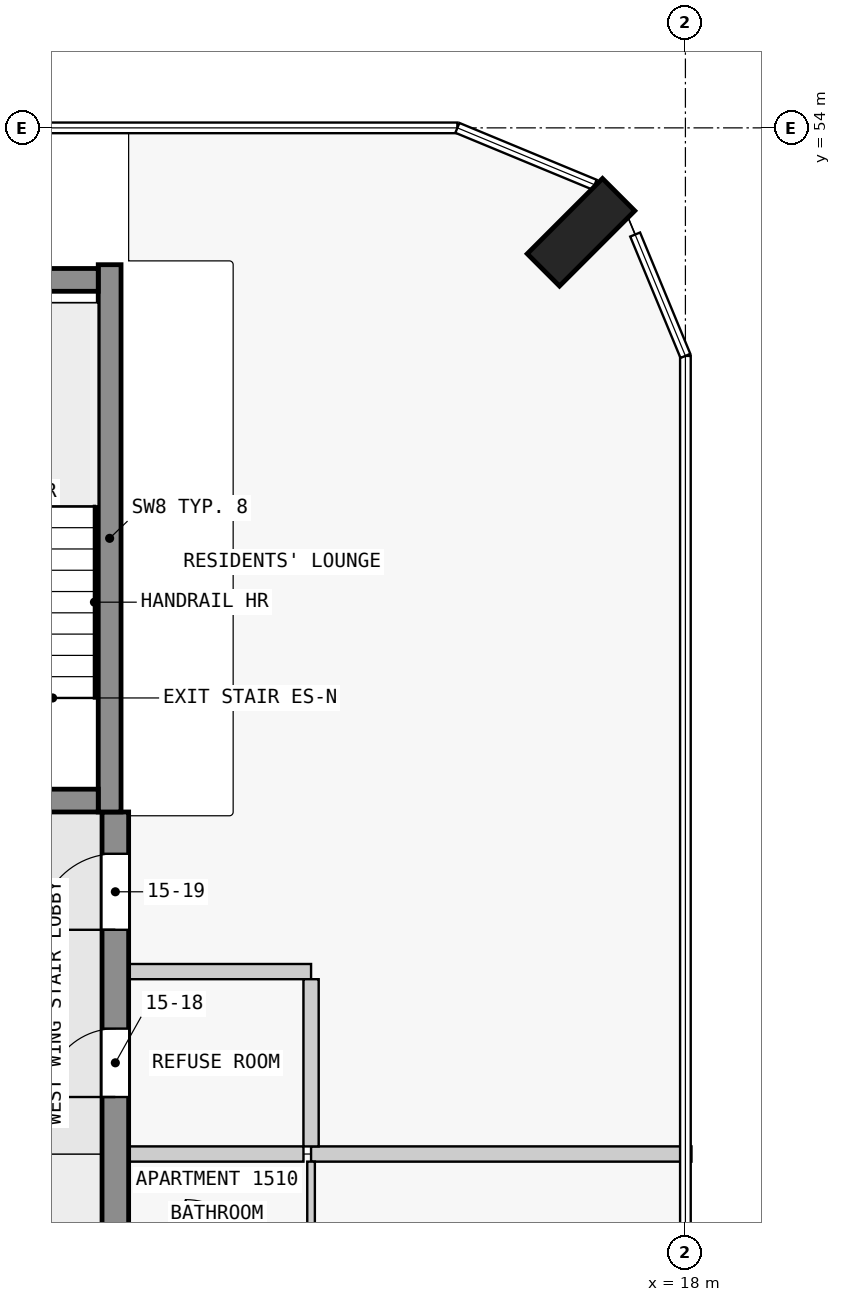
"""IFC4 building model, lengths in metres.
Left out: names, types, materials, properties, quantities, classifications, styles, units other than length and angle.
Written with IfcOpenShell. Run it as: python <this file> out.ifc"""

import sys

from ifc_helpers import new_model, si_unit, direction, frame, frame_2d, origin, origin_2d, place, context, subcontext, project, spatial, rectangle, extrude, element, fill, save


model = new_model("IFC4")
c1 = context("Model", 3, precision=1e-05, world=origin(), true_north=direction((0.0, 1.0)))
c2 = subcontext(c1, "Body", "Model", "MODEL_VIEW")
j1 = project(units=[si_unit("LENGTHUNIT", "METRE"), si_unit("PLANEANGLEUNIT", "RADIAN")], contexts=[c1])
p1 = place(None, origin())
s1 = spatial("IfcSite", under=j1, at=p1, CompositionType="ELEMENT")
p2 = place(p1, origin())
s2 = spatial("IfcBuilding", under=s1, at=p2, CompositionType="ELEMENT")
p3 = place(p2, frame((0.0, 0.0, 61.8)))
s3 = spatial("IfcBuildingStorey", under=s2, at=p3, CompositionType="ELEMENT", Elevation=61.8)
p4 = place(p3, frame((16.626, 52.626, 0.0), z_axis=(0.0, 0.0, 1.0), x_axis=(-0.707106781187, 0.707106781187, 0.0)))
e1 = element("IfcColumn", 1, at=p4, inside=s3, PredefinedType="COLUMN", context=c2, shape_type="SweptSolid", body=[
    extrude(rectangle(XDim=0.6, YDim=1.4, at=origin_2d()), origin(), (0.0, 0.0, 1.0), 3.5),
])
p5 = place(p3, frame((7.725, 45.15, 0.0), z_axis=(0.0, 0.0, 1.0), x_axis=(1.0, 0.0, 0.0)))
e2 = element("IfcWall", 2, at=p5, inside=s3, PredefinedType="SHEAR", context=c2, shape_type="SweptSolid", body=[
    extrude(rectangle(XDim=2.55, YDim=0.3, at=frame_2d((1.275, 0.0))), origin(), (0.0, 0.0, 1.0), 3.5),
])
p6 = place(p5, frame((0.725, 0.0, 0.0)))
e3 = element("IfcOpeningElement", 3, at=p6, cuts=e2, PredefinedType="OPENING", context=c2, shape_type="SweptSolid", body=[
    extrude(rectangle(XDim=1.1, YDim=2.1, at=frame_2d((0.55, 1.05))), frame((0.0, 0.16, 0.0), z_axis=(0.0, -1.0, 0.0), x_axis=(1.0, 0.0, 0.0)), (0.0, 0.0, 1.0), 0.32),
])
p7 = place(p3, frame((7.725, 52.0, 0.0), z_axis=(0.0, 0.0, 1.0), x_axis=(1.0, 0.0, 0.0)))
e4 = element("IfcWall", 4, at=p7, inside=s3, PredefinedType="SHEAR", context=c2, shape_type="SweptSolid", body=[
    extrude(rectangle(XDim=2.55, YDim=0.3, at=frame_2d((1.275, 0.0))), origin(), (0.0, 0.0, 1.0), 3.5),
])
p8 = place(p3, frame((10.425, 45.0, 0.0), z_axis=(0.0, 0.0, 1.0), x_axis=(0.0, 1.0, 0.0)))
e5 = element("IfcWall", 5, at=p8, inside=s3, PredefinedType="SHEAR", context=c2, shape_type="SweptSolid", body=[
    extrude(rectangle(XDim=7.2, YDim=0.3, at=frame_2d((3.6, 0.0))), origin(), (0.0, 0.0, 1.0), 3.5),
])
p9 = place(p3, frame((10.5, 18.0, 0.0), z_axis=(0.0, 0.0, 1.0), x_axis=(0.0, 1.0, 0.0)))
e6 = element("IfcWall", 6, at=p9, inside=s3, PredefinedType="SHEAR", context=c2, shape_type="SweptSolid", body=[
    extrude(rectangle(XDim=27.0, YDim=0.35, at=frame_2d((13.5, 0.0))), origin(), (0.0, 0.0, 1.0), 3.25),
])
p10 = place(p9, frame((4.05, 0.0, 0.0)))
e7 = element("IfcOpeningElement", 7, at=p10, cuts=e6, PredefinedType="OPENING", context=c2, shape_type="SweptSolid", body=[
    extrude(rectangle(XDim=1.0, YDim=2.1, at=frame_2d((0.5, 1.05))), frame((0.0, 0.185, 0.0), z_axis=(0.0, -1.0, 0.0), x_axis=(1.0, 0.0, 0.0)), (0.0, 0.0, 1.0), 0.37),
])
p11 = place(p9, frame((10.75, 0.0, 0.0)))
e8 = element("IfcOpeningElement", 8, at=p11, cuts=e6, PredefinedType="OPENING", context=c2, shape_type="SweptSolid", body=[
    extrude(rectangle(XDim=1.0, YDim=2.1, at=frame_2d((0.5, 1.05))), frame((0.0, 0.185, 0.0), z_axis=(0.0, -1.0, 0.0), x_axis=(1.0, 0.0, 0.0)), (0.0, 0.0, 1.0), 0.37),
])
p12 = place(p9, frame((15.25, 0.0, 0.0)))
e9 = element("IfcOpeningElement", 9, at=p12, cuts=e6, PredefinedType="OPENING", context=c2, shape_type="SweptSolid", body=[
    extrude(rectangle(XDim=1.0, YDim=2.1, at=frame_2d((0.5, 1.05))), frame((0.0, 0.185, 0.0), z_axis=(0.0, -1.0, 0.0), x_axis=(1.0, 0.0, 0.0)), (0.0, 0.0, 1.0), 0.37),
])
p13 = place(p9, frame((19.75, 0.0, 0.0)))
e10 = element("IfcOpeningElement", 10, at=p13, cuts=e6, PredefinedType="OPENING", context=c2, shape_type="SweptSolid", body=[
    extrude(rectangle(XDim=1.0, YDim=2.1, at=frame_2d((0.5, 1.05))), frame((0.0, 0.185, 0.0), z_axis=(0.0, -1.0, 0.0), x_axis=(1.0, 0.0, 0.0)), (0.0, 0.0, 1.0), 0.37),
])
p14 = place(p9, frame((23.25, 0.0, 0.0)))
e11 = element("IfcOpeningElement", 11, at=p14, cuts=e6, PredefinedType="OPENING", context=c2, shape_type="SweptSolid", body=[
    extrude(rectangle(XDim=0.9, YDim=2.1, at=frame_2d((0.45, 1.05))), frame((0.0, 0.185, 0.0), z_axis=(0.0, -1.0, 0.0), x_axis=(1.0, 0.0, 0.0)), (0.0, 0.0, 1.0), 0.37),
])
p15 = place(p9, frame((25.45, 0.0, 0.0)))
e12 = element("IfcOpeningElement", 12, at=p15, cuts=e6, PredefinedType="OPENING", context=c2, shape_type="SweptSolid", body=[
    extrude(rectangle(XDim=1.0, YDim=2.1, at=frame_2d((0.5, 1.05))), frame((0.0, 0.185, 0.0), z_axis=(0.0, -1.0, 0.0), x_axis=(1.0, 0.0, 0.0)), (0.0, 0.0, 1.0), 0.37),
])
p16 = place(p3, frame((12.975, 40.5, 0.0), z_axis=(0.0, 0.0, 1.0), x_axis=(-1.0, 0.0, 0.0)))
e13 = element("IfcWall", 13, at=p16, inside=s3, PredefinedType="PARTITIONING", context=c2, shape_type="SweptSolid", body=[
    extrude(rectangle(XDim=2.3, YDim=0.2, at=frame_2d((1.15, 0.0))), origin(), (0.0, 0.0, 1.0), 3.25),
])
p17 = place(p3, frame((13.075, 40.5, 0.0), z_axis=(0.0, 0.0, 1.0), x_axis=(1.0, 0.0, 0.0)))
e14 = element("IfcWall", 14, at=p17, inside=s3, PredefinedType="PARTITIONING", context=c2, shape_type="SweptSolid", body=[
    extrude(rectangle(XDim=5.005, YDim=0.2, at=frame_2d((2.502, 0.0))), origin(), (0.0, 0.0, 1.0), 3.25),
])
p18 = place(p3, frame((13.075, 42.9, 0.0), z_axis=(0.0, 0.0, 1.0), x_axis=(-1.0, 0.0, 0.0)))
e15 = element("IfcWall", 15, at=p18, inside=s3, PredefinedType="PARTITIONING", context=c2, shape_type="SweptSolid", body=[
    extrude(rectangle(XDim=2.4, YDim=0.2, at=frame_2d((1.2, 0.0))), origin(), (0.0, 0.0, 1.0), 3.25),
])
p19 = place(p3, frame((13.075, 39.05, 0.0), z_axis=(0.0, 0.0, 1.0), x_axis=(0.0, 1.0, 0.0)))
e16 = element("IfcWall", 16, at=p19, inside=s3, PredefinedType="PARTITIONING", context=c2, shape_type="SweptSolid", body=[
    extrude(rectangle(XDim=1.35, YDim=0.1, at=frame_2d((0.675, 0.0))), origin(), (0.0, 0.0, 1.0), 3.25),
])
p20 = place(p3, frame((13.075, 40.6, 0.0), z_axis=(0.0, 0.0, 1.0), x_axis=(0.0, 1.0, 0.0)))
e17 = element("IfcWall", 17, at=p20, inside=s3, PredefinedType="PARTITIONING", context=c2, shape_type="SweptSolid", body=[
    extrude(rectangle(XDim=2.2, YDim=0.2, at=frame_2d((1.1, 0.0))), origin(), (0.0, 0.0, 1.0), 3.25),
])
p21 = place(p14, origin())
e18 = element("IfcDoor", 18, at=p21, inside=s3, OperationType="SINGLE_SWING_RIGHT", PredefinedType="DOOR", context=c2, shape_type="SweptSolid", body=[
    extrude(rectangle(XDim=0.9, YDim=2.1, at=frame_2d((0.45, 1.05))), frame((0.0, 0.025, 0.0), z_axis=(0.0, -1.0, 0.0), x_axis=(1.0, 0.0, 0.0)), (0.0, 0.0, 1.0), 0.05),
])
fill(e11, e18)
p22 = place(p15, origin())
e19 = element("IfcDoor", 19, at=p22, inside=s3, OperationType="SINGLE_SWING_RIGHT", PredefinedType="DOOR", context=c2, shape_type="SweptSolid", body=[
    extrude(rectangle(XDim=1.0, YDim=2.1, at=frame_2d((0.5, 1.05))), frame((0.0, 0.025, 0.0), z_axis=(0.0, -1.0, 0.0), x_axis=(1.0, 0.0, 0.0)), (0.0, 0.0, 1.0), 0.05),
])
fill(e12, e19)
save(model, sys.argv[1])
